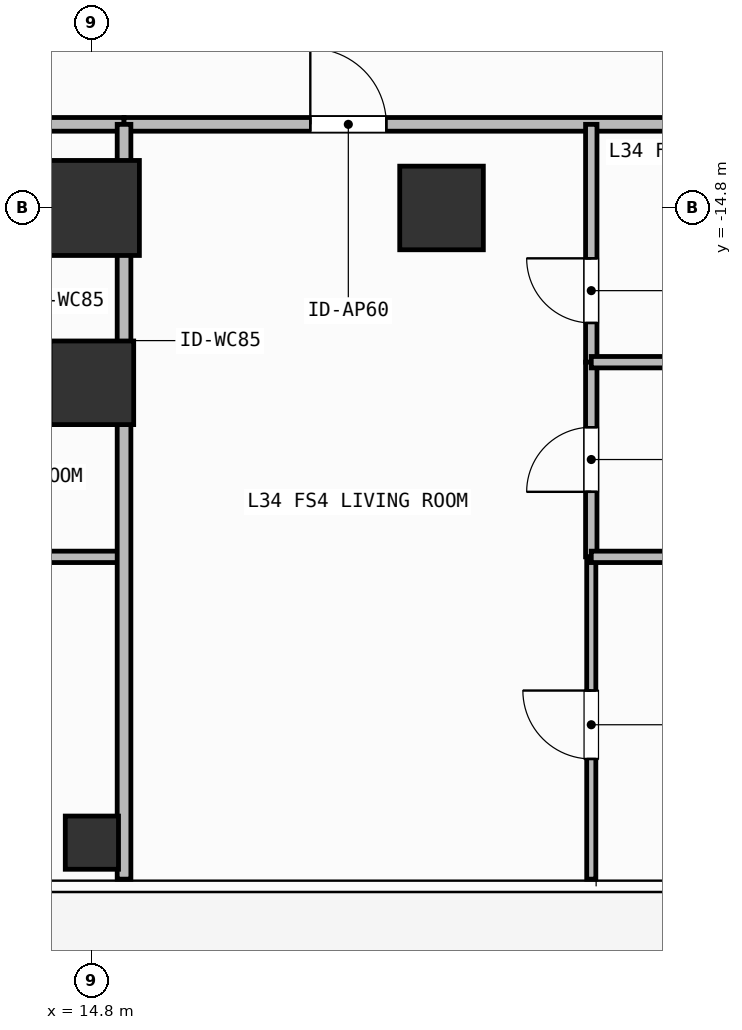
"""IFC4 building model, lengths in metres.
Left out: names, types, materials, properties, quantities, classifications, styles, units other than length and angle.
Written with IfcOpenShell. Run it as: python <this file> out.ifc"""

import sys

from ifc_helpers import new_model, si_unit, direction, frame, frame_2d, origin, origin_2d, place, context, subcontext, project, spatial, rectangle, hollow_rectangle, extrude, element, fill, save


model = new_model("IFC4")
c1 = context("Model", 3, precision=1e-05, world=origin(), true_north=direction((0.0, 1.0)))
c2 = subcontext(c1, "Body", "Model", "MODEL_VIEW")
j1 = project(units=[si_unit("LENGTHUNIT", "METRE"), si_unit("PLANEANGLEUNIT", "RADIAN")], contexts=[c1])
p1 = place(None, origin())
s1 = spatial("IfcSite", under=j1, at=p1, CompositionType="ELEMENT")
p2 = place(p1, origin())
s2 = spatial("IfcBuilding", under=s1, at=p2, CompositionType="ELEMENT")
p3 = place(p2, frame((0.0, 0.0, 136.8)))
s3 = spatial("IfcBuildingStorey", under=s2, at=p3, CompositionType="ELEMENT", Elevation=136.8)
p4 = place(p3, frame((14.8, -14.8, 0.0), z_axis=(0.0, 0.0, 1.0), x_axis=(1.0, 0.0, 0.0)))
e1 = element("IfcColumn", 1, at=p4, inside=s3, PredefinedType="COLUMN", context=c2, shape_type="SweptSolid", body=[
    extrude(rectangle(XDim=1.25, YDim=1.25, at=origin_2d()), origin(), (0.0, 0.0, 1.0), 3.9),
])
for number, where, z_axis, x_axis in (
    (2, (19.4, -14.8, 0.0), (0.0, 0.0, 1.0), (1.0, 0.0, 0.0)),
    (3, (14.8, -17.1, 0.0), (0.0, 0.0, 1.0), (1.0, 0.0, 0.0)),
):
    element("IfcColumn", number, at=place(p3, frame(where, z_axis=z_axis, x_axis=x_axis)), inside=s3, PredefinedType="COLUMN", context=c2, shape_type="SweptSolid", body=[
        extrude(rectangle(XDim=1.1, YDim=1.1, at=origin_2d()), origin(), (0.0, 0.0, 1.0), 3.9),
    ])
p5 = place(p3, frame((14.8, -23.15, 0.0), z_axis=(0.0, 0.0, 1.0), x_axis=(1.0, 0.0, 0.0)))
e4 = element("IfcColumn", 4, at=p5, inside=s3, PredefinedType="COLUMN", context=c2, shape_type="SweptSolid", body=[
    extrude(hollow_rectangle(XDim=0.7, YDim=0.7, WallThickness=0.032, at=origin_2d()), origin(), (0.0, 0.0, 1.0), 3.9),
])
p6 = place(p3, frame((3.9, -13.7, 0.0), z_axis=(0.0, 0.0, 1.0), x_axis=(1.0, 0.0, 0.0)))
e5 = element("IfcWall", 5, at=p6, inside=s3, PredefinedType="PARTITIONING", context=c2, shape_type="SweptSolid", body=[
    extrude(rectangle(XDim=11.323, YDim=0.18, at=frame_2d((5.662, 0.0))), origin(), (0.0, 0.0, 1.0), 3.68),
])
p7 = place(p6, frame((5.519, 0.0, 0.0)))
e6 = element("IfcOpeningElement", 6, at=p7, cuts=e5, PredefinedType="OPENING", context=c2, shape_type="SweptSolid", body=[
    extrude(rectangle(XDim=1.0, YDim=2.2, at=frame_2d((0.5, 1.1))), frame((0.0, 0.1, 0.0), z_axis=(0.0, -1.0, 0.0), x_axis=(1.0, 0.0, 0.0)), (0.0, 0.0, 1.0), 0.2),
])
p8 = place(p3, frame((15.223, -13.7, 0.0), z_axis=(0.0, 0.0, 1.0), x_axis=(1.0, 0.0, 0.0)))
e7 = element("IfcWall", 7, at=p8, inside=s3, PredefinedType="PARTITIONING", context=c2, shape_type="SweptSolid", body=[
    extrude(rectangle(XDim=8.897, YDim=0.18, at=frame_2d((4.449, 0.0))), origin(), (0.0, 0.0, 1.0), 3.68),
])
p9 = place(p8, frame((2.451, 0.0, 0.0)))
e8 = element("IfcOpeningElement", 8, at=p9, cuts=e7, PredefinedType="OPENING", context=c2, shape_type="SweptSolid", body=[
    extrude(rectangle(XDim=1.0, YDim=2.2, at=frame_2d((0.5, 1.1))), frame((0.0, 0.1, 0.0), z_axis=(0.0, -1.0, 0.0), x_axis=(1.0, 0.0, 0.0)), (0.0, 0.0, 1.0), 0.2),
])
p10 = place(p3, frame((21.37, -16.829, 0.0), z_axis=(0.0, 0.0, 1.0), x_axis=(0.0, 1.0, 0.0)))
e9 = element("IfcWall", 9, at=p10, inside=s3, PredefinedType="PARTITIONING", context=c2, shape_type="SweptSolid", body=[
    extrude(rectangle(XDim=3.129, YDim=0.15, at=frame_2d((1.564, 0.0))), origin(), (0.0, 0.0, 1.0), 3.68),
])
p11 = place(p10, frame((0.516, 0.0, 0.0)))
e10 = element("IfcOpeningElement", 10, at=p11, cuts=e9, PredefinedType="OPENING", context=c2, shape_type="SweptSolid", body=[
    extrude(rectangle(XDim=0.85, YDim=2.1, at=frame_2d((0.425, 1.05))), frame((0.0, 0.085, 0.0), z_axis=(0.0, -1.0, 0.0), x_axis=(1.0, 0.0, 0.0)), (0.0, 0.0, 1.0), 0.17),
])
p12 = place(p3, frame((21.37, -19.39, 0.0), z_axis=(0.0, 0.0, 1.0), x_axis=(0.0, 1.0, 0.0)))
e11 = element("IfcWall", 11, at=p12, inside=s3, PredefinedType="PARTITIONING", context=c2, shape_type="SweptSolid", body=[
    extrude(rectangle(XDim=2.561, YDim=0.15, at=frame_2d((1.28, 0.0))), origin(), (0.0, 0.0, 1.0), 3.68),
])
p13 = place(p12, frame((0.855, 0.0, 0.0)))
e12 = element("IfcOpeningElement", 12, at=p13, cuts=e11, PredefinedType="OPENING", context=c2, shape_type="SweptSolid", body=[
    extrude(rectangle(XDim=0.85, YDim=2.1, at=frame_2d((0.425, 1.05))), frame((0.0, 0.085, 0.0), z_axis=(0.0, -1.0, 0.0), x_axis=(1.0, 0.0, 0.0)), (0.0, 0.0, 1.0), 0.17),
])
p14 = place(p3, frame((21.37, -23.63, 0.0), z_axis=(0.0, 0.0, 1.0), x_axis=(0.0, 1.0, 0.0)))
e13 = element("IfcWall", 13, at=p14, inside=s3, PredefinedType="PARTITIONING", context=c2, shape_type="SweptSolid", body=[
    extrude(rectangle(XDim=4.24, YDim=0.12, at=frame_2d((2.12, 0.0))), origin(), (0.0, 0.0, 1.0), 3.68),
])
p15 = place(p14, frame((1.581, 0.0, 0.0)))
e14 = element("IfcOpeningElement", 14, at=p15, cuts=e13, PredefinedType="OPENING", context=c2, shape_type="SweptSolid", body=[
    extrude(rectangle(XDim=0.9, YDim=2.1, at=frame_2d((0.45, 1.05))), frame((0.0, 0.07, 0.0), z_axis=(0.0, -1.0, 0.0), x_axis=(1.0, 0.0, 0.0)), (0.0, 0.0, 1.0), 0.14),
])
p16 = place(p3, frame((11.69, -19.39, 0.0), z_axis=(0.0, 0.0, 1.0), x_axis=(1.0, 0.0, 0.0)))
e15 = element("IfcWall", 15, at=p16, inside=s3, PredefinedType="PARTITIONING", context=c2, shape_type="SweptSolid", body=[
    extrude(rectangle(XDim=3.533, YDim=0.15, at=frame_2d((1.767, 0.0))), origin(), (0.0, 0.0, 1.0), 3.68),
])
for number, where, z_axis, x_axis in (
    (16, (21.37, -16.829, 0.0), (0.0, 0.0, 1.0), (1.0, 0.0, 0.0)),
    (17, (21.37, -19.39, 0.0), (0.0, 0.0, 1.0), (1.0, 0.0, 0.0)),
):
    element("IfcWall", number, at=place(p3, frame(where, z_axis=z_axis, x_axis=x_axis)), inside=s3, PredefinedType="PARTITIONING", context=c2, shape_type="SweptSolid", body=[
        extrude(rectangle(XDim=2.75, YDim=0.15, at=frame_2d((1.375, 0.0))), origin(), (0.0, 0.0, 1.0), 3.68),
    ])
p17 = place(p3, frame((15.223, -23.63, 0.0), z_axis=(0.0, 0.0, 1.0), x_axis=(0.0, 1.0, 0.0)))
e18 = element("IfcWall", 18, at=p17, inside=s3, PredefinedType="PARTITIONING", context=c2, shape_type="SweptSolid", body=[
    extrude(rectangle(XDim=9.93, YDim=0.18, at=frame_2d((4.965, 0.0))), origin(), (0.0, 0.0, 1.0), 3.68),
])
p18 = place(p9, origin())
e19 = element("IfcDoor", 19, at=p18, inside=s3, OperationType="SINGLE_SWING_LEFT", PredefinedType="DOOR", context=c2, shape_type="SweptSolid", body=[
    extrude(rectangle(XDim=1.0, YDim=2.2, at=frame_2d((0.5, 1.1))), frame((0.0, 0.025, 0.0), z_axis=(0.0, -1.0, 0.0), x_axis=(1.0, 0.0, 0.0)), (0.0, 0.0, 1.0), 0.05),
])
fill(e8, e19)
p19 = place(p11, origin())
e20 = element("IfcDoor", 20, at=p19, inside=s3, OperationType="SINGLE_SWING_RIGHT", PredefinedType="DOOR", context=c2, shape_type="SweptSolid", body=[
    extrude(rectangle(XDim=0.85, YDim=2.1, at=frame_2d((0.425, 1.05))), frame((0.0, 0.025, 0.0), z_axis=(0.0, -1.0, 0.0), x_axis=(1.0, 0.0, 0.0)), (0.0, 0.0, 1.0), 0.05),
])
fill(e10, e20)
p20 = place(p13, origin())
e21 = element("IfcDoor", 21, at=p20, inside=s3, OperationType="SINGLE_SWING_LEFT", PredefinedType="DOOR", context=c2, shape_type="SweptSolid", body=[
    extrude(rectangle(XDim=0.85, YDim=2.1, at=frame_2d((0.425, 1.05))), frame((0.0, 0.025, 0.0), z_axis=(0.0, -1.0, 0.0), x_axis=(1.0, 0.0, 0.0)), (0.0, 0.0, 1.0), 0.05),
])
fill(e12, e21)
p21 = place(p15, origin())
e22 = element("IfcDoor", 22, at=p21, inside=s3, OperationType="SINGLE_SWING_RIGHT", PredefinedType="DOOR", context=c2, shape_type="SweptSolid", body=[
    extrude(rectangle(XDim=0.9, YDim=2.1, at=frame_2d((0.45, 1.05))), frame((0.0, 0.025, 0.0), z_axis=(0.0, -1.0, 0.0), x_axis=(1.0, 0.0, 0.0)), (0.0, 0.0, 1.0), 0.05),
])
fill(e14, e22)
save(model, sys.argv[1])
